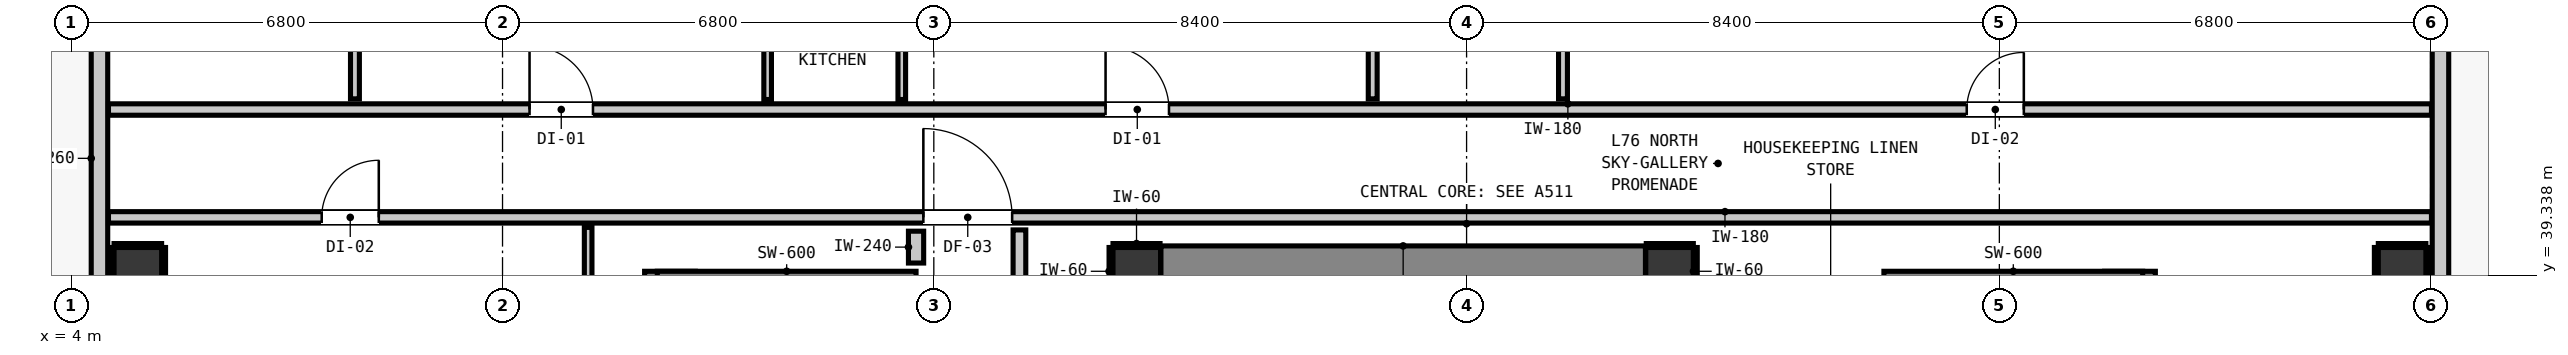
"""IFC4 building model, lengths in metres.
Left out: names, types, materials, properties, quantities, classifications, styles, units other than length and angle.
Written with IfcOpenShell. Run it as: python <this file> out.ifc"""

import sys

from ifc_helpers import new_model, si_unit, direction, frame, frame_2d, origin, origin_2d, place, context, subcontext, project, spatial, rectangle, extrude, element, fill, save


model = new_model("IFC4")
c1 = context("Model", 3, precision=1e-05, world=origin(), true_north=direction((0.0, 1.0)))
c2 = subcontext(c1, "Body", "Model", "MODEL_VIEW")
j1 = project(units=[si_unit("LENGTHUNIT", "METRE"), si_unit("PLANEANGLEUNIT", "RADIAN")], contexts=[c1])
p1 = place(None, origin())
s1 = spatial("IfcSite", under=j1, at=p1, CompositionType="ELEMENT")
p2 = place(p1, origin())
s2 = spatial("IfcBuilding", under=s1, at=p2, CompositionType="ELEMENT")
p3 = place(p2, frame((0.0, 0.0, 262.24)))
s3 = spatial("IfcBuildingStorey", under=s2, at=p3, CompositionType="ELEMENT", Elevation=262.24)
for number, where, z_axis, x_axis in (
    (1, (20.8, 39.4, 0.0), (0.0, 0.0, 1.0), (1.0, 0.0, 0.0)),
    (2, (29.2, 39.4, 0.0), (0.0, 0.0, 1.0), (1.0, 0.0, 0.0)),
):
    element("IfcColumn", number, at=place(p3, frame(where, z_axis=z_axis, x_axis=x_axis)), inside=s3, PredefinedType="COLUMN", context=c2, shape_type="SweptSolid", body=[
        extrude(rectangle(XDim=0.75, YDim=0.75, at=origin_2d()), origin(), (0.0, 0.0, 1.0), 3.32),
    ])
p4 = place(p3, frame((13.44, 31.08, 0.0), z_axis=(0.0, 0.0, 1.0), x_axis=(0.0, 1.0, 0.0)))
e3 = element("IfcWall", 3, at=p4, inside=s3, PredefinedType="SHEAR", context=c2, shape_type="SweptSolid", body=[
    extrude(rectangle(XDim=8.32, YDim=0.8, at=frame_2d((4.16, 0.0))), origin(), (0.0, 0.0, 1.0), 3.32),
])
p5 = place(p3, frame((13.24, 39.1, 0.0), z_axis=(0.0, 0.0, 1.0), x_axis=(1.0, 0.0, 0.0)))
e4 = element("IfcWall", 4, at=p5, inside=s3, PredefinedType="SHEAR", context=c2, shape_type="SweptSolid", body=[
    extrude(rectangle(XDim=4.08, YDim=0.6, at=frame_2d((2.04, 0.0))), origin(), (0.0, 0.0, 1.0), 3.32),
])
p6 = place(p3, frame((36.46, 31.08, 0.0), z_axis=(0.0, 0.0, 1.0), x_axis=(0.0, 1.0, 0.0)))
e5 = element("IfcWall", 5, at=p6, inside=s3, PredefinedType="SHEAR", context=c2, shape_type="SweptSolid", body=[
    extrude(rectangle(XDim=8.32, YDim=0.8, at=frame_2d((4.16, 0.0))), origin(), (0.0, 0.0, 1.0), 3.32),
])
p7 = place(p3, frame((32.58, 39.1, 0.0), z_axis=(0.0, 0.0, 1.0), x_axis=(1.0, 0.0, 0.0)))
e6 = element("IfcWall", 6, at=p7, inside=s3, PredefinedType="SHEAR", context=c2, shape_type="SweptSolid", body=[
    extrude(rectangle(XDim=4.08, YDim=0.6, at=frame_2d((2.04, 0.0))), origin(), (0.0, 0.0, 1.0), 3.32),
])
p8 = place(p3, frame((21.18, 39.4, 0.0), z_axis=(0.0, 0.0, 1.0), x_axis=(1.0, 0.0, 0.0)))
e7 = element("IfcWall", 7, at=p8, inside=s3, PredefinedType="SHEAR", context=c2, shape_type="SweptSolid", body=[
    extrude(rectangle(XDim=7.64, YDim=0.8, at=frame_2d((3.82, 0.0))), origin(), (0.0, 0.0, 1.0), 3.32),
])
for number, where, z_axis, x_axis in (
    (8, (5.05, 39.4, 0.0), (0.0, 0.0, 1.0), (1.0, 0.0, 0.0)),
    (9, (40.75, 39.4, 0.0), (0.0, 0.0, 1.0), (1.0, 0.0, 0.0)),
):
    element("IfcColumn", number, at=place(p3, frame(where, z_axis=z_axis, x_axis=x_axis)), inside=s3, PredefinedType="COLUMN", context=c2, shape_type="SweptSolid", body=[
        extrude(rectangle(XDim=0.75, YDim=0.75, at=origin_2d()), origin(), (0.0, 0.0, 1.0), 3.32),
    ])
p9 = place(p3, frame((4.445, 18.545, 0.0), z_axis=(0.0, 0.0, 1.0), x_axis=(0.0, 1.0, 0.0)))
e10 = element("IfcWall", 10, at=p9, inside=s3, PredefinedType="STANDARD", context=c2, shape_type="SweptSolid", body=[
    extrude(rectangle(XDim=30.31, YDim=0.26, at=frame_2d((15.155, 0.0))), origin(), (0.0, 0.0, 1.0), 3.1),
])
p10 = place(p9, frame((4.434, 0.0, 0.0)))
e11 = element("IfcOpeningElement", 11, at=p10, cuts=e10, PredefinedType="OPENING", context=c2, shape_type="SweptSolid", body=[
    extrude(rectangle(XDim=1.0, YDim=2.15, at=frame_2d((0.5, 1.075))), frame((0.0, 0.14, 0.0), z_axis=(0.0, -1.0, 0.0), x_axis=(1.0, 0.0, 0.0)), (0.0, 0.0, 1.0), 0.28),
])
p11 = place(p9, frame((28.316, 0.0, 0.85)))
e12 = element("IfcOpeningElement", 12, at=p11, cuts=e10, PredefinedType="OPENING", context=c2, shape_type="SweptSolid", body=[
    extrude(rectangle(XDim=0.9, YDim=1.5, at=frame_2d((0.45, 0.75))), frame((0.0, 0.14, 0.0), z_axis=(0.0, -1.0, 0.0), x_axis=(1.0, 0.0, 0.0)), (0.0, 0.0, 1.0), 0.28),
])
p12 = place(p9, frame((16.055, 0.0, 0.85)))
e13 = element("IfcOpeningElement", 13, at=p12, cuts=e10, PredefinedType="OPENING", context=c2, shape_type="SweptSolid", body=[
    extrude(rectangle(XDim=0.9, YDim=1.5, at=frame_2d((0.45, 0.75))), frame((0.0, 0.14, 0.0), z_axis=(0.0, -1.0, 0.0), x_axis=(1.0, 0.0, 0.0)), (0.0, 0.0, 1.0), 0.28),
])
p13 = place(p3, frame((41.355, 48.855, 0.0), z_axis=(0.0, 0.0, 1.0), x_axis=(0.0, -1.0, 0.0)))
e14 = element("IfcWall", 14, at=p13, inside=s3, PredefinedType="STANDARD", context=c2, shape_type="SweptSolid", body=[
    extrude(rectangle(XDim=30.31, YDim=0.26, at=frame_2d((15.155, 0.0))), origin(), (0.0, 0.0, 1.0), 3.1),
])
p14 = place(p13, frame((0.91, 0.0, 0.0)))
e15 = element("IfcOpeningElement", 15, at=p14, cuts=e14, PredefinedType="OPENING", context=c2, shape_type="SweptSolid", body=[
    extrude(rectangle(XDim=1.0, YDim=2.15, at=frame_2d((0.5, 1.075))), frame((0.0, 0.14, 0.0), z_axis=(0.0, -1.0, 0.0), x_axis=(1.0, 0.0, 0.0)), (0.0, 0.0, 1.0), 0.28),
])
p15 = place(p13, frame((4.007, 0.0, 0.85)))
e16 = element("IfcOpeningElement", 16, at=p15, cuts=e14, PredefinedType="OPENING", context=c2, shape_type="SweptSolid", body=[
    extrude(rectangle(XDim=0.9, YDim=1.5, at=frame_2d((0.45, 0.75))), frame((0.0, 0.14, 0.0), z_axis=(0.0, -1.0, 0.0), x_axis=(1.0, 0.0, 0.0)), (0.0, 0.0, 1.0), 0.28),
])
p16 = place(p3, frame((4.587, 40.25, 0.0), z_axis=(0.0, 0.0, 1.0), x_axis=(1.0, 0.0, 0.0)))
e17 = element("IfcWall", 17, at=p16, inside=s3, PredefinedType="PARTITIONING", context=c2, shape_type="SweptSolid", body=[
    extrude(rectangle(XDim=36.626, YDim=0.18, at=frame_2d((18.313, 0.0))), origin(), (0.0, 0.0, 1.0), 3.1),
])
p17 = place(p16, frame((12.848, 0.0, 0.0)))
e18 = element("IfcOpeningElement", 18, at=p17, cuts=e17, PredefinedType="OPENING", context=c2, shape_type="SweptSolid", body=[
    extrude(rectangle(XDim=1.4, YDim=2.15, at=frame_2d((0.7, 1.075))), frame((0.0, 0.1, 0.0), z_axis=(0.0, -1.0, 0.0), x_axis=(1.0, 0.0, 0.0)), (0.0, 0.0, 1.0), 0.2),
])
p18 = place(p16, frame((3.362, 0.0, 0.0)))
e19 = element("IfcOpeningElement", 19, at=p18, cuts=e17, PredefinedType="OPENING", context=c2, shape_type="SweptSolid", body=[
    extrude(rectangle(XDim=0.9, YDim=2.1, at=frame_2d((0.45, 1.05))), frame((0.0, 0.1, 0.0), z_axis=(0.0, -1.0, 0.0), x_axis=(1.0, 0.0, 0.0)), (0.0, 0.0, 1.0), 0.2),
])
p19 = place(p3, frame((4.587, 41.95, 0.0), z_axis=(0.0, 0.0, 1.0), x_axis=(1.0, 0.0, 0.0)))
e20 = element("IfcWall", 20, at=p19, inside=s3, PredefinedType="PARTITIONING", context=c2, shape_type="SweptSolid", body=[
    extrude(rectangle(XDim=36.626, YDim=0.18, at=frame_2d((18.313, 0.0))), origin(), (0.0, 0.0, 1.0), 3.1),
])
p20 = place(p19, frame((6.639, 0.0, 0.0)))
e21 = element("IfcOpeningElement", 21, at=p20, cuts=e20, PredefinedType="OPENING", context=c2, shape_type="SweptSolid", body=[
    extrude(rectangle(XDim=1.0, YDim=2.15, at=frame_2d((0.5, 1.075))), frame((0.0, 0.1, 0.0), z_axis=(0.0, -1.0, 0.0), x_axis=(1.0, 0.0, 0.0)), (0.0, 0.0, 1.0), 0.2),
])
p21 = place(p19, frame((15.721, 0.0, 0.0)))
e22 = element("IfcOpeningElement", 22, at=p21, cuts=e20, PredefinedType="OPENING", context=c2, shape_type="SweptSolid", body=[
    extrude(rectangle(XDim=1.0, YDim=2.15, at=frame_2d((0.5, 1.075))), frame((0.0, 0.1, 0.0), z_axis=(0.0, -1.0, 0.0), x_axis=(1.0, 0.0, 0.0)), (0.0, 0.0, 1.0), 0.2),
])
p22 = place(p19, frame((29.299, 0.0, 0.0)))
e23 = element("IfcOpeningElement", 23, at=p22, cuts=e20, PredefinedType="OPENING", context=c2, shape_type="SweptSolid", body=[
    extrude(rectangle(XDim=0.9, YDim=2.1, at=frame_2d((0.45, 1.05))), frame((0.0, 0.1, 0.0), z_axis=(0.0, -1.0, 0.0), x_axis=(1.0, 0.0, 0.0)), (0.0, 0.0, 1.0), 0.2),
])
p23 = place(p3, frame((17.32, 39.53, 0.0), z_axis=(0.0, 0.0, 1.0), x_axis=(0.0, 1.0, 0.0)))
e24 = element("IfcWall", 24, at=p23, inside=s3, PredefinedType="PARTITIONING", context=c2, shape_type="SweptSolid", body=[
    extrude(rectangle(XDim=0.502, YDim=0.24, at=frame_2d((0.251, 0.0))), origin(), (0.0, 0.0, 1.0), 3.1),
])
p24 = place(p3, frame((18.95, 38.918, 0.0), z_axis=(0.0, 0.0, 1.0), x_axis=(0.0, 1.0, 0.0)))
e25 = element("IfcWall", 25, at=p24, inside=s3, PredefinedType="PARTITIONING", context=c2, shape_type="SweptSolid", body=[
    extrude(rectangle(XDim=1.134, YDim=0.2, at=frame_2d((0.567, 0.0))), origin(), (0.0, 0.0, 1.0), 3.1),
])
p25 = place(p3, frame((8.473, 42.118, 0.0), z_axis=(0.0, 0.0, 1.0), x_axis=(0.0, 1.0, 0.0)))
e26 = element("IfcWall", 26, at=p25, inside=s3, PredefinedType="PARTITIONING", context=c2, shape_type="SweptSolid", body=[
    extrude(rectangle(XDim=3.49, YDim=0.14, at=frame_2d((1.745, 0.0))), origin(), (0.0, 0.0, 1.0), 3.1),
])
p26 = place(p25, frame((1.318, 0.0, 0.0)))
e27 = element("IfcOpeningElement", 27, at=p26, cuts=e26, PredefinedType="OPENING", context=c2, shape_type="SweptSolid", body=[
    extrude(rectangle(XDim=0.86, YDim=2.02, at=frame_2d((0.43, 1.01))), frame((0.0, 0.08, 0.0), z_axis=(0.0, -1.0, 0.0), x_axis=(1.0, 0.0, 0.0)), (0.0, 0.0, 1.0), 0.16),
])
p27 = place(p3, frame((24.52, 42.118, 0.0), z_axis=(0.0, 0.0, 1.0), x_axis=(0.0, 1.0, 0.0)))
e28 = element("IfcWall", 28, at=p27, inside=s3, PredefinedType="PARTITIONING", context=c2, shape_type="SweptSolid", body=[
    extrude(rectangle(XDim=3.49, YDim=0.14, at=frame_2d((1.745, 0.0))), origin(), (0.0, 0.0, 1.0), 3.1),
])
p28 = place(p27, frame((1.298, 0.0, 0.0)))
e29 = element("IfcOpeningElement", 29, at=p28, cuts=e28, PredefinedType="OPENING", context=c2, shape_type="SweptSolid", body=[
    extrude(rectangle(XDim=0.9, YDim=2.1, at=frame_2d((0.45, 1.05))), frame((0.0, 0.08, 0.0), z_axis=(0.0, -1.0, 0.0), x_axis=(1.0, 0.0, 0.0)), (0.0, 0.0, 1.0), 0.16),
])
p29 = place(p3, frame((27.52, 42.118, 0.0), z_axis=(0.0, 0.0, 1.0), x_axis=(0.0, 1.0, 0.0)))
e30 = element("IfcWall", 30, at=p29, inside=s3, PredefinedType="PARTITIONING", context=c2, shape_type="SweptSolid", body=[
    extrude(rectangle(XDim=3.49, YDim=0.14, at=frame_2d((1.745, 0.0))), origin(), (0.0, 0.0, 1.0), 3.1),
])
p30 = place(p3, frame((12.15, 29.938, 0.0), z_axis=(0.0, 0.0, 1.0), x_axis=(0.0, 1.0, 0.0)))
e31 = element("IfcWall", 31, at=p30, inside=s3, PredefinedType="PARTITIONING", context=c2, shape_type="SweptSolid", body=[
    extrude(rectangle(XDim=10.154, YDim=0.12, at=frame_2d((5.077, 0.0))), origin(), (0.0, 0.0, 1.0), 3.1),
])
p31 = place(p3, frame((14.98, 42.108, 0.0), z_axis=(0.0, 0.0, 1.0), x_axis=(0.0, 1.0, 0.0)))
e32 = element("IfcWall", 32, at=p31, inside=s3, PredefinedType="PARTITIONING", context=c2, shape_type="SweptSolid", body=[
    extrude(rectangle(XDim=8.705, YDim=0.12, at=frame_2d((4.353, 0.0))), origin(), (0.0, 0.0, 1.0), 3.1),
])
p32 = place(p31, frame((3.817, 0.0, 0.0)))
e33 = element("IfcOpeningElement", 33, at=p32, cuts=e32, PredefinedType="OPENING", context=c2, shape_type="SweptSolid", body=[
    extrude(rectangle(XDim=0.9, YDim=2.1, at=frame_2d((0.45, 1.05))), frame((0.0, 0.07, 0.0), z_axis=(0.0, -1.0, 0.0), x_axis=(1.0, 0.0, 0.0)), (0.0, 0.0, 1.0), 0.14),
])
p33 = place(p3, frame((17.095, 42.108, 0.0), z_axis=(0.0, 0.0, 1.0), x_axis=(0.0, 1.0, 0.0)))
e34 = element("IfcWall", 34, at=p33, inside=s3, PredefinedType="PARTITIONING", context=c2, shape_type="SweptSolid", body=[
    extrude(rectangle(XDim=8.705, YDim=0.12, at=frame_2d((4.353, 0.0))), origin(), (0.0, 0.0, 1.0), 3.1),
])
p34 = place(p3, frame((20.425, 39.807, 0.0), z_axis=(0.0, 0.0, 1.0), x_axis=(1.0, 0.0, 0.0)))
e35 = element("IfcWall", 35, at=p34, inside=s3, PredefinedType="PARTITIONING", context=c2, shape_type="SweptSolid", body=[
    extrude(rectangle(XDim=0.742, YDim=0.06, at=frame_2d((0.371, 0.0))), origin(), (0.0, 0.0, 1.0), 1.45),
])
p35 = place(p3, frame((20.393, 39.025, 0.0), z_axis=(0.0, 0.0, 1.0), x_axis=(0.0, 1.0, 0.0)))
e36 = element("IfcWall", 36, at=p35, inside=s3, PredefinedType="PARTITIONING", context=c2, shape_type="SweptSolid", body=[
    extrude(rectangle(XDim=0.75, YDim=0.06, at=frame_2d((0.375, 0.0))), origin(), (0.0, 0.0, 1.0), 1.45),
])
p36 = place(p3, frame((28.833, 39.807, 0.0), z_axis=(0.0, 0.0, 1.0), x_axis=(1.0, 0.0, 0.0)))
e37 = element("IfcWall", 37, at=p36, inside=s3, PredefinedType="PARTITIONING", context=c2, shape_type="SweptSolid", body=[
    extrude(rectangle(XDim=0.742, YDim=0.06, at=frame_2d((0.371, 0.0))), origin(), (0.0, 0.0, 1.0), 1.45),
])
for number, where, z_axis, x_axis in (
    (38, (29.607, 39.025, 0.0), (0.0, 0.0, 1.0), (0.0, 1.0, 0.0)),
    (39, (4.675, 39.807, 0.0), (0.0, 0.0, 1.0), (1.0, 0.0, 0.0)),
    (40, (4.643, 39.025, 0.0), (0.0, 0.0, 1.0), (0.0, 1.0, 0.0)),
    (41, (5.457, 39.025, 0.0), (0.0, 0.0, 1.0), (0.0, 1.0, 0.0)),
    (42, (40.375, 39.807, 0.0), (0.0, 0.0, 1.0), (1.0, 0.0, 0.0)),
    (43, (40.343, 39.025, 0.0), (0.0, 0.0, 1.0), (0.0, 1.0, 0.0)),
    (44, (41.157, 39.025, 0.0), (0.0, 0.0, 1.0), (0.0, 1.0, 0.0)),
):
    element("IfcWall", number, at=place(p3, frame(where, z_axis=z_axis, x_axis=x_axis)), inside=s3, PredefinedType="PARTITIONING", context=c2, shape_type="SweptSolid", body=[
        extrude(rectangle(XDim=0.75, YDim=0.06, at=frame_2d((0.375, 0.0))), origin(), (0.0, 0.0, 1.0), 1.45),
    ])
p37 = place(p17, origin())
e45 = element("IfcDoor", 45, at=p37, inside=s3, OperationType="SINGLE_SWING_LEFT", PredefinedType="DOOR", context=c2, shape_type="SweptSolid", body=[
    extrude(rectangle(XDim=1.4, YDim=2.15, at=frame_2d((0.7, 1.075))), frame((0.0, 0.025, 0.0), z_axis=(0.0, -1.0, 0.0), x_axis=(1.0, 0.0, 0.0)), (0.0, 0.0, 1.0), 0.05),
])
fill(e18, e45)
p38 = place(p20, origin())
e46 = element("IfcDoor", 46, at=p38, inside=s3, OperationType="SINGLE_SWING_LEFT", PredefinedType="DOOR", context=c2, shape_type="SweptSolid", body=[
    extrude(rectangle(XDim=1.0, YDim=2.15, at=frame_2d((0.5, 1.075))), frame((0.0, 0.025, 0.0), z_axis=(0.0, -1.0, 0.0), x_axis=(1.0, 0.0, 0.0)), (0.0, 0.0, 1.0), 0.05),
])
fill(e21, e46)
p39 = place(p21, origin())
e47 = element("IfcDoor", 47, at=p39, inside=s3, OperationType="SINGLE_SWING_LEFT", PredefinedType="DOOR", context=c2, shape_type="SweptSolid", body=[
    extrude(rectangle(XDim=1.0, YDim=2.15, at=frame_2d((0.5, 1.075))), frame((0.0, 0.025, 0.0), z_axis=(0.0, -1.0, 0.0), x_axis=(1.0, 0.0, 0.0)), (0.0, 0.0, 1.0), 0.05),
])
fill(e22, e47)
p40 = place(p22, origin())
e48 = element("IfcDoor", 48, at=p40, inside=s3, OperationType="SINGLE_SWING_RIGHT", PredefinedType="DOOR", context=c2, shape_type="SweptSolid", body=[
    extrude(rectangle(XDim=0.9, YDim=2.1, at=frame_2d((0.45, 1.05))), frame((0.0, 0.025, 0.0), z_axis=(0.0, -1.0, 0.0), x_axis=(1.0, 0.0, 0.0)), (0.0, 0.0, 1.0), 0.05),
])
fill(e23, e48)
p41 = place(p18, origin())
e49 = element("IfcDoor", 49, at=p41, inside=s3, OperationType="SINGLE_SWING_RIGHT", PredefinedType="DOOR", context=c2, shape_type="SweptSolid", body=[
    extrude(rectangle(XDim=0.9, YDim=2.1, at=frame_2d((0.45, 1.05))), frame((0.0, 0.025, 0.0), z_axis=(0.0, -1.0, 0.0), x_axis=(1.0, 0.0, 0.0)), (0.0, 0.0, 1.0), 0.05),
])
fill(e19, e49)
save(model, sys.argv[1])
